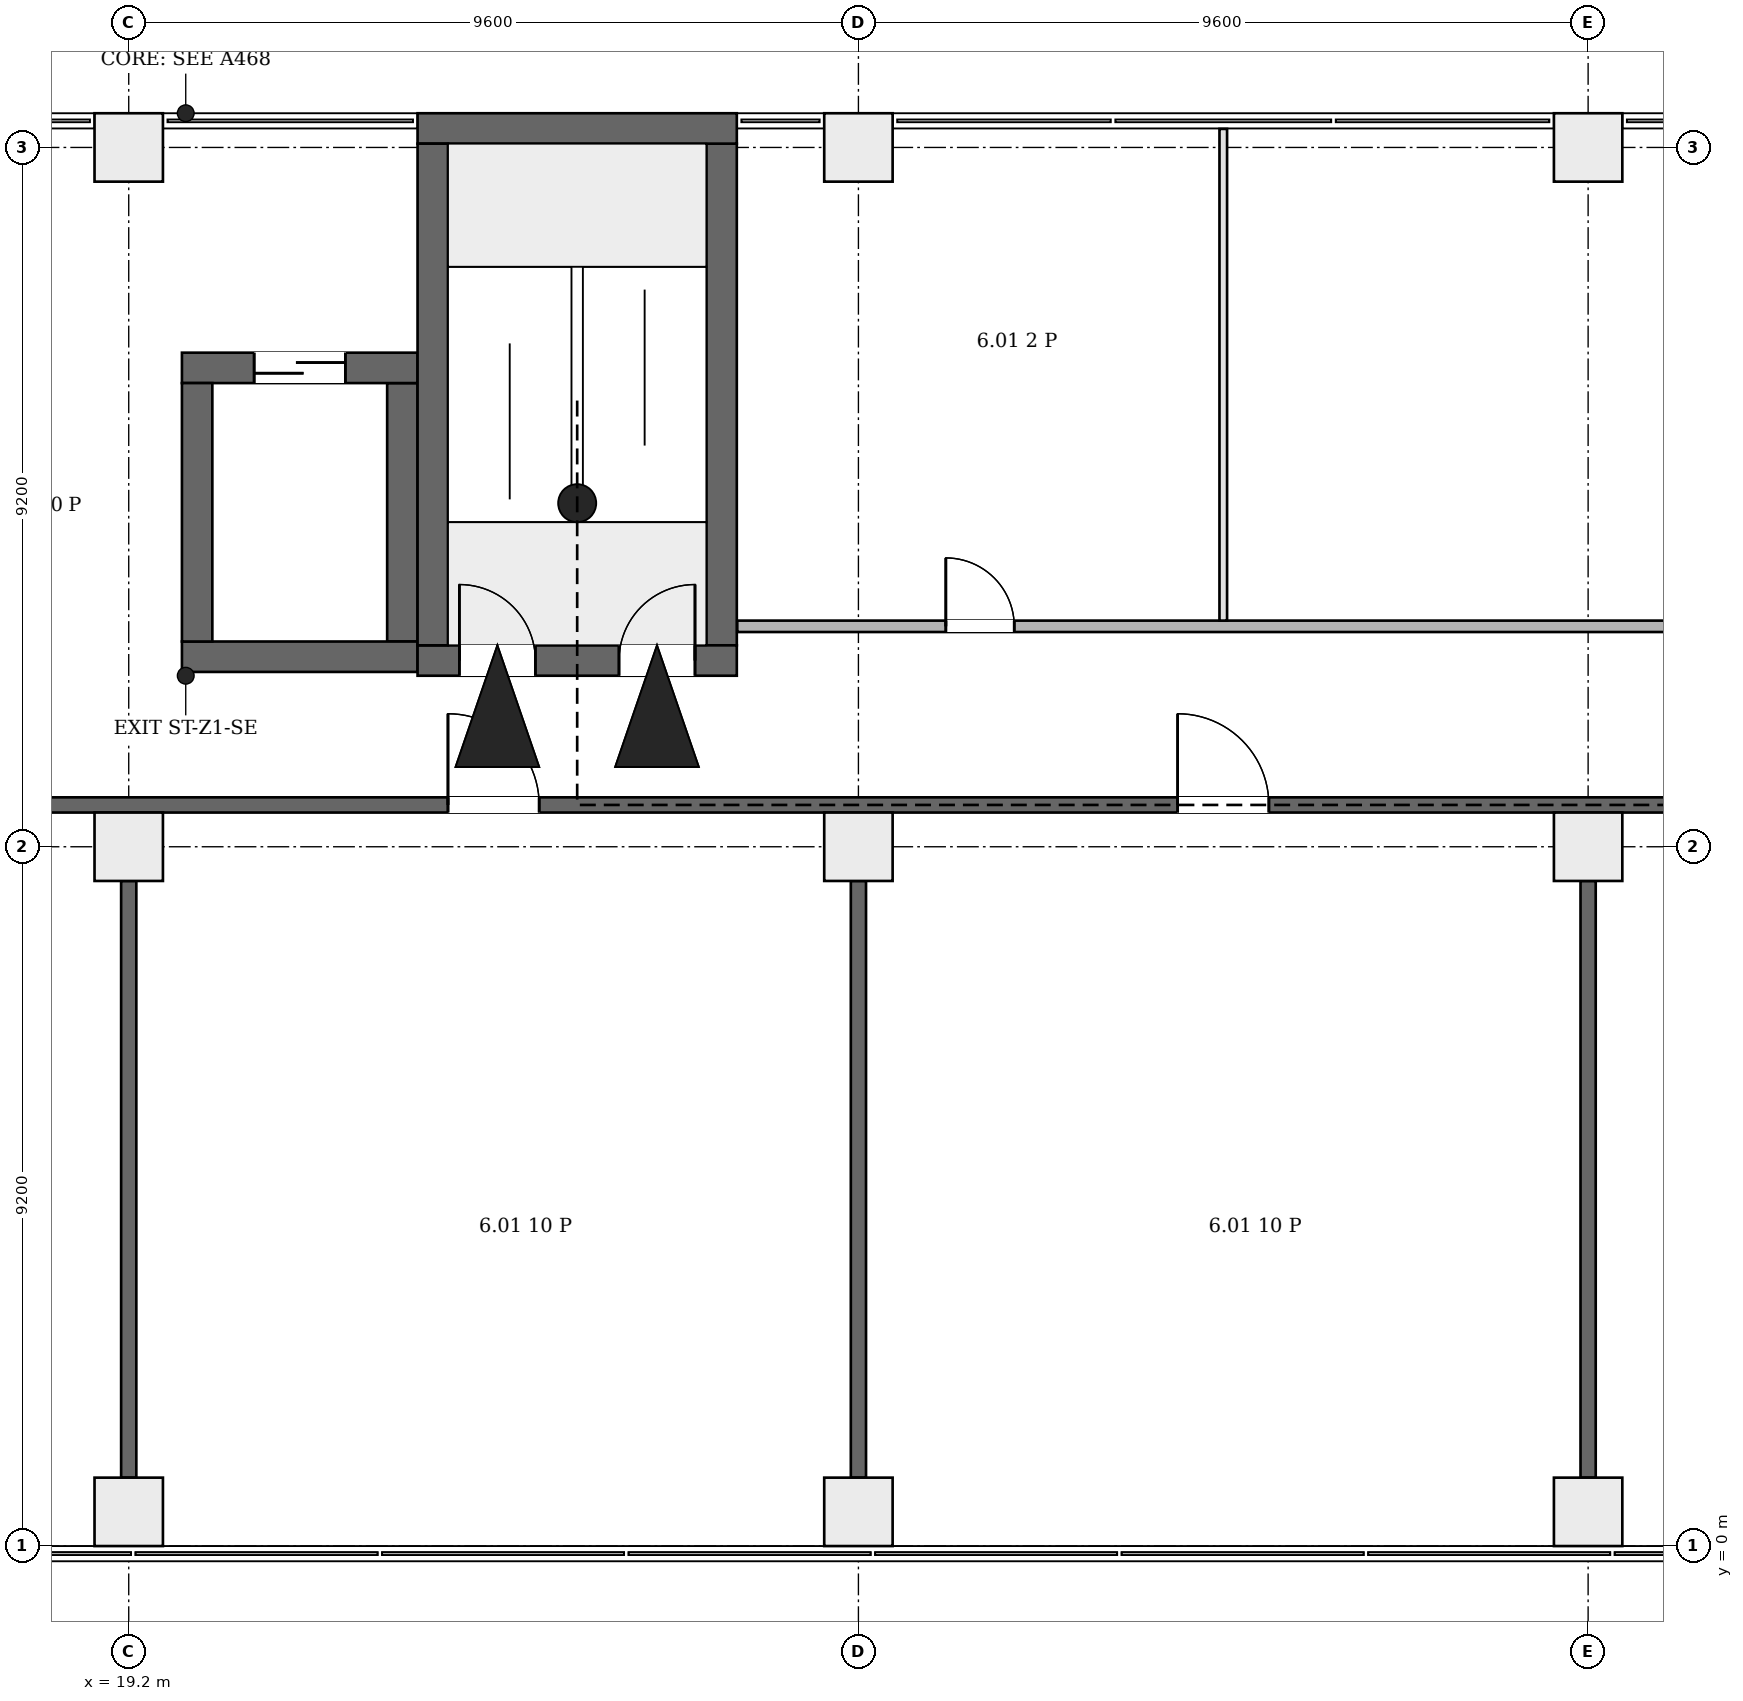
"""IFC4 building model, lengths in metres.
Left out: names, types, materials, properties, quantities, classifications, styles, units other than length and angle.
Written with IfcOpenShell. Run it as: python <this file> out.ifc"""

import sys

from ifc_helpers import new_model, si_unit, direction, frame, frame_2d, origin, origin_2d, place, context, subcontext, project, spatial, rectangle, extrude, element, fill, save


model = new_model("IFC4")
c1 = context("Model", 3, precision=1e-05, world=origin(), true_north=direction((0.0, 1.0)))
c2 = subcontext(c1, "Body", "Model", "MODEL_VIEW")
j1 = project(units=[si_unit("LENGTHUNIT", "METRE"), si_unit("PLANEANGLEUNIT", "RADIAN")], contexts=[c1])
p1 = place(None, origin())
s1 = spatial("IfcSite", under=j1, at=p1, CompositionType="ELEMENT")
p2 = place(p1, origin())
s2 = spatial("IfcBuilding", under=s1, at=p2, CompositionType="ELEMENT")
p3 = place(p2, frame((0.0, 0.0, 36.1)))
s3 = spatial("IfcBuildingStorey", under=s2, at=p3, CompositionType="ELEMENT", Elevation=36.1)
p4 = place(p3, frame((23.0, 11.65, 0.0), z_axis=(0.0, 0.0, 1.0), x_axis=(1.0, 0.0, 0.0)))
e1 = element("IfcWall", 1, at=p4, inside=s3, PredefinedType="SHEAR", context=c2, shape_type="SweptSolid", body=[
    extrude(rectangle(XDim=4.2, YDim=0.4, at=frame_2d((2.1, 0.0))), origin(), (0.0, 0.0, 1.0), 4.2),
])
p5 = place(p4, frame((0.55, 0.0, 0.0)))
e2 = element("IfcOpeningElement", 2, at=p5, cuts=e1, PredefinedType="OPENING", context=c2, shape_type="SweptSolid", body=[
    extrude(rectangle(XDim=1.0, YDim=2.1, at=frame_2d((0.5, 1.05))), frame((0.0, 0.21, 0.0), z_axis=(0.0, -1.0, 0.0), x_axis=(1.0, 0.0, 0.0)), (0.0, 0.0, 1.0), 0.42),
])
p6 = place(p4, frame((2.65, 0.0, 0.0)))
e3 = element("IfcOpeningElement", 3, at=p6, cuts=e1, PredefinedType="OPENING", context=c2, shape_type="SweptSolid", body=[
    extrude(rectangle(XDim=1.0, YDim=2.1, at=frame_2d((0.5, 1.05))), frame((0.0, 0.21, 0.0), z_axis=(0.0, -1.0, 0.0), x_axis=(1.0, 0.0, 0.0)), (0.0, 0.0, 1.0), 0.42),
])
p7 = place(p3, frame((23.0, 18.65, 0.0), z_axis=(0.0, 0.0, 1.0), x_axis=(1.0, 0.0, 0.0)))
e4 = element("IfcWall", 4, at=p7, inside=s3, PredefinedType="SHEAR", context=c2, shape_type="SweptSolid", body=[
    extrude(rectangle(XDim=4.2, YDim=0.4, at=frame_2d((2.1, 0.0))), origin(), (0.0, 0.0, 1.0), 4.2),
])
for number, where, z_axis, x_axis in (
    (5, (23.2, 11.85, 0.0), (0.0, 0.0, 1.0), (0.0, 1.0, 0.0)),
    (6, (27.0, 11.85, 0.0), (0.0, 0.0, 1.0), (0.0, 1.0, 0.0)),
):
    element("IfcWall", number, at=place(p3, frame(where, z_axis=z_axis, x_axis=x_axis)), inside=s3, PredefinedType="SHEAR", context=c2, shape_type="SweptSolid", body=[
        extrude(rectangle(XDim=6.6, YDim=0.4, at=frame_2d((3.3, 0.0))), origin(), (0.0, 0.0, 1.0), 4.2),
    ])
p8 = place(p3, frame((19.9, 11.7, 0.0), z_axis=(0.0, 0.0, 1.0), x_axis=(1.0, 0.0, 0.0)))
e7 = element("IfcWall", 7, at=p8, inside=s3, PredefinedType="SHEAR", context=c2, shape_type="SweptSolid", body=[
    extrude(rectangle(XDim=3.1, YDim=0.4, at=frame_2d((1.55, 0.0))), origin(), (0.0, 0.0, 1.0), 4.2),
])
p9 = place(p3, frame((19.9, 15.5, 0.0), z_axis=(0.0, 0.0, 1.0), x_axis=(1.0, 0.0, 0.0)))
e8 = element("IfcWall", 8, at=p9, inside=s3, PredefinedType="SHEAR", context=c2, shape_type="SweptSolid", body=[
    extrude(rectangle(XDim=3.1, YDim=0.4, at=frame_2d((1.55, 0.0))), origin(), (0.0, 0.0, 1.0), 4.2),
])
p10 = place(p9, frame((0.95, 0.0, 0.0)))
e9 = element("IfcOpeningElement", 9, at=p10, cuts=e8, PredefinedType="OPENING", context=c2, shape_type="SweptSolid", body=[
    extrude(rectangle(XDim=1.2, YDim=2.1, at=frame_2d((0.6, 1.05))), frame((0.0, 0.21, 0.0), z_axis=(0.0, -1.0, 0.0), x_axis=(1.0, 0.0, 0.0)), (0.0, 0.0, 1.0), 0.42),
])
for number, where, z_axis, x_axis in (
    (10, (20.1, 11.9, 0.0), (0.0, 0.0, 1.0), (0.0, 1.0, 0.0)),
    (11, (22.8, 11.9, 0.0), (0.0, 0.0, 1.0), (0.0, 1.0, 0.0)),
):
    element("IfcWall", number, at=place(p3, frame(where, z_axis=z_axis, x_axis=x_axis)), inside=s3, PredefinedType="SHEAR", context=c2, shape_type="SweptSolid", body=[
        extrude(rectangle(XDim=3.4, YDim=0.4, at=frame_2d((1.7, 0.0))), origin(), (0.0, 0.0, 1.0), 4.2),
    ])
for number, where, z_axis, x_axis in (
    (12, (19.2, 0.45, 0.0), (0.0, 0.0, 1.0), (1.0, 0.0, 0.0)),
    (13, (28.8, 0.45, 0.0), (0.0, 0.0, 1.0), (1.0, 0.0, 0.0)),
    (14, (38.4, 0.45, 0.0), (0.0, 0.0, 1.0), (1.0, 0.0, 0.0)),
    (15, (19.2, 9.2, 0.0), (0.0, 0.0, 1.0), (1.0, 0.0, 0.0)),
    (16, (28.8, 9.2, 0.0), (0.0, 0.0, 1.0), (1.0, 0.0, 0.0)),
    (17, (38.4, 9.2, 0.0), (0.0, 0.0, 1.0), (1.0, 0.0, 0.0)),
    (18, (19.2, 18.4, 0.0), (0.0, 0.0, 1.0), (1.0, 0.0, 0.0)),
    (19, (28.8, 18.4, 0.0), (0.0, 0.0, 1.0), (1.0, 0.0, 0.0)),
    (20, (38.4, 18.4, 0.0), (0.0, 0.0, 1.0), (1.0, 0.0, 0.0)),
):
    element("IfcColumn", number, at=place(p3, frame(where, z_axis=z_axis, x_axis=x_axis)), inside=s3, PredefinedType="COLUMN", context=c2, shape_type="SweptSolid", body=[
        extrude(rectangle(XDim=0.9, YDim=0.9, at=origin_2d()), origin(), (0.0, 0.0, 1.0), 4.2),
    ])
p11 = place(p3, frame((4.3, 9.75, 0.0), z_axis=(0.0, 0.0, 1.0), x_axis=(1.0, 0.0, 0.0)))
e21 = element("IfcWall", 21, at=p11, inside=s3, PredefinedType="PARTITIONING", context=c2, shape_type="SweptSolid", body=[
    extrude(rectangle(XDim=43.894, YDim=0.2, at=frame_2d((21.947, 0.0))), origin(), (0.0, 0.0, 1.0), 3.9),
])
p12 = place(p11, frame((2.1, 0.0, 0.0)))
e22 = element("IfcOpeningElement", 22, at=p12, cuts=e21, PredefinedType="OPENING", context=c2, shape_type="SweptSolid", body=[
    extrude(rectangle(XDim=1.2, YDim=2.1, at=frame_2d((0.6, 1.05))), frame((0.0, 0.11, 0.0), z_axis=(0.0, -1.0, 0.0), x_axis=(1.0, 0.0, 0.0)), (0.0, 0.0, 1.0), 0.22),
])
p13 = place(p11, frame((9.5, 0.0, 0.0)))
e23 = element("IfcOpeningElement", 23, at=p13, cuts=e21, PredefinedType="OPENING", context=c2, shape_type="SweptSolid", body=[
    extrude(rectangle(XDim=1.2, YDim=2.1, at=frame_2d((0.6, 1.05))), frame((0.0, 0.11, 0.0), z_axis=(0.0, -1.0, 0.0), x_axis=(1.0, 0.0, 0.0)), (0.0, 0.0, 1.0), 0.22),
])
p14 = place(p11, frame((19.1, 0.0, 0.0)))
e24 = element("IfcOpeningElement", 24, at=p14, cuts=e21, PredefinedType="OPENING", context=c2, shape_type="SweptSolid", body=[
    extrude(rectangle(XDim=1.2, YDim=2.1, at=frame_2d((0.6, 1.05))), frame((0.0, 0.11, 0.0), z_axis=(0.0, -1.0, 0.0), x_axis=(1.0, 0.0, 0.0)), (0.0, 0.0, 1.0), 0.22),
])
p15 = place(p11, frame((28.7, 0.0, 0.0)))
e25 = element("IfcOpeningElement", 25, at=p15, cuts=e21, PredefinedType="OPENING", context=c2, shape_type="SweptSolid", body=[
    extrude(rectangle(XDim=1.2, YDim=2.1, at=frame_2d((0.6, 1.05))), frame((0.0, 0.11, 0.0), z_axis=(0.0, -1.0, 0.0), x_axis=(1.0, 0.0, 0.0)), (0.0, 0.0, 1.0), 0.22),
])
p16 = place(p11, frame((38.4, 0.0, 0.0)))
e26 = element("IfcOpeningElement", 26, at=p16, cuts=e21, PredefinedType="OPENING", context=c2, shape_type="SweptSolid", body=[
    extrude(rectangle(XDim=1.2, YDim=2.1, at=frame_2d((0.6, 1.05))), frame((0.0, 0.11, 0.0), z_axis=(0.0, -1.0, 0.0), x_axis=(1.0, 0.0, 0.0)), (0.0, 0.0, 1.0), 0.22),
])
p17 = place(p3, frame((19.2, 0.9, 0.0), z_axis=(0.0, 0.0, 1.0), x_axis=(0.0, 1.0, 0.0)))
e27 = element("IfcWall", 27, at=p17, inside=s3, PredefinedType="PARTITIONING", context=c2, shape_type="SweptSolid", body=[
    extrude(rectangle(XDim=7.85, YDim=0.2, at=frame_2d((3.925, 0.0))), origin(), (0.0, 0.0, 1.0), 3.9),
])
p18 = place(p3, frame((27.206, 12.1, 0.0), z_axis=(0.0, 0.0, 1.0), x_axis=(1.0, 0.0, 0.0)))
e28 = element("IfcWall", 28, at=p18, inside=s3, PredefinedType="PARTITIONING", context=c2, shape_type="SweptSolid", body=[
    extrude(rectangle(XDim=20.988, YDim=0.15, at=frame_2d((10.494, 0.0))), origin(), (0.0, 0.0, 1.0), 3.9),
])
p19 = place(p18, frame((2.744, 0.0, 0.0)))
e29 = element("IfcOpeningElement", 29, at=p19, cuts=e28, PredefinedType="OPENING", context=c2, shape_type="SweptSolid", body=[
    extrude(rectangle(XDim=0.9, YDim=2.1, at=frame_2d((0.45, 1.05))), frame((0.0, 0.085, 0.0), z_axis=(0.0, -1.0, 0.0), x_axis=(1.0, 0.0, 0.0)), (0.0, 0.0, 1.0), 0.17),
])
p20 = place(p18, frame((13.194, 0.0, 0.0)))
e30 = element("IfcOpeningElement", 30, at=p20, cuts=e28, PredefinedType="OPENING", context=c2, shape_type="SweptSolid", body=[
    extrude(rectangle(XDim=1.0, YDim=2.1, at=frame_2d((0.5, 1.05))), frame((0.0, 0.085, 0.0), z_axis=(0.0, -1.0, 0.0), x_axis=(1.0, 0.0, 0.0)), (0.0, 0.0, 1.0), 0.17),
])
p21 = place(p3, frame((28.8, 0.9, 0.0), z_axis=(0.0, 0.0, 1.0), x_axis=(0.0, 1.0, 0.0)))
e31 = element("IfcWall", 31, at=p21, inside=s3, PredefinedType="PARTITIONING", context=c2, shape_type="SweptSolid", body=[
    extrude(rectangle(XDim=7.85, YDim=0.2, at=frame_2d((3.925, 0.0))), origin(), (0.0, 0.0, 1.0), 3.9),
])
p22 = place(p3, frame((33.6, 12.175, 0.0), z_axis=(0.0, 0.0, 1.0), x_axis=(0.0, 1.0, 0.0)))
e32 = element("IfcWall", 32, at=p22, inside=s3, PredefinedType="PARTITIONING", context=c2, shape_type="SweptSolid", body=[
    extrude(rectangle(XDim=6.469, YDim=0.1, at=frame_2d((3.234, 0.0))), origin(), (0.0, 0.0, 1.0), 3.9),
])
p23 = place(p3, frame((38.4, 0.9, 0.0), z_axis=(0.0, 0.0, 1.0), x_axis=(0.0, 1.0, 0.0)))
e33 = element("IfcWall", 33, at=p23, inside=s3, PredefinedType="PARTITIONING", context=c2, shape_type="SweptSolid", body=[
    extrude(rectangle(XDim=7.85, YDim=0.2, at=frame_2d((3.925, 0.0))), origin(), (0.0, 0.0, 1.0), 3.9),
])
p24 = place(p5, origin())
e34 = element("IfcDoor", 34, at=p24, inside=s3, OperationType="SINGLE_SWING_RIGHT", PredefinedType="DOOR", context=c2, shape_type="SweptSolid", body=[
    extrude(rectangle(XDim=1.0, YDim=2.1, at=frame_2d((0.5, 1.05))), frame((0.0, 0.025, 0.0), z_axis=(0.0, -1.0, 0.0), x_axis=(1.0, 0.0, 0.0)), (0.0, 0.0, 1.0), 0.05),
])
fill(e2, e34)
p25 = place(p6, origin())
e35 = element("IfcDoor", 35, at=p25, inside=s3, OperationType="SINGLE_SWING_LEFT", PredefinedType="DOOR", context=c2, shape_type="SweptSolid", body=[
    extrude(rectangle(XDim=1.0, YDim=2.1, at=frame_2d((0.5, 1.05))), frame((0.0, 0.025, 0.0), z_axis=(0.0, -1.0, 0.0), x_axis=(1.0, 0.0, 0.0)), (0.0, 0.0, 1.0), 0.05),
])
fill(e3, e35)
p26 = place(p10, origin())
e36 = element("IfcDoor", 36, at=p26, inside=s3, OperationType="DOUBLE_DOOR_SLIDING", PredefinedType="DOOR", context=c2, shape_type="SweptSolid", body=[
    extrude(rectangle(XDim=1.2, YDim=2.1, at=frame_2d((0.6, 1.05))), frame((0.0, 0.025, 0.0), z_axis=(0.0, -1.0, 0.0), x_axis=(1.0, 0.0, 0.0)), (0.0, 0.0, 1.0), 0.05),
])
fill(e9, e36)
p27 = place(p14, origin())
e37 = element("IfcDoor", 37, at=p27, inside=s3, OperationType="SINGLE_SWING_LEFT", PredefinedType="DOOR", context=c2, shape_type="SweptSolid", body=[
    extrude(rectangle(XDim=1.2, YDim=2.1, at=frame_2d((0.6, 1.05))), frame((0.0, 0.025, 0.0), z_axis=(0.0, -1.0, 0.0), x_axis=(1.0, 0.0, 0.0)), (0.0, 0.0, 1.0), 0.05),
])
fill(e24, e37)
p28 = place(p15, origin())
e38 = element("IfcDoor", 38, at=p28, inside=s3, OperationType="SINGLE_SWING_RIGHT", PredefinedType="DOOR", context=c2, shape_type="SweptSolid", body=[
    extrude(rectangle(XDim=1.2, YDim=2.1, at=frame_2d((0.6, 1.05))), frame((0.0, 0.025, 0.0), z_axis=(0.0, -1.0, 0.0), x_axis=(1.0, 0.0, 0.0)), (0.0, 0.0, 1.0), 0.05),
])
fill(e25, e38)
p29 = place(p19, origin())
e39 = element("IfcDoor", 39, at=p29, inside=s3, OperationType="SINGLE_SWING_LEFT", PredefinedType="DOOR", context=c2, shape_type="SweptSolid", body=[
    extrude(rectangle(XDim=0.9, YDim=2.1, at=frame_2d((0.45, 1.05))), frame((0.0, 0.025, 0.0), z_axis=(0.0, -1.0, 0.0), x_axis=(1.0, 0.0, 0.0)), (0.0, 0.0, 1.0), 0.05),
])
fill(e29, e39)
save(model, sys.argv[1])
